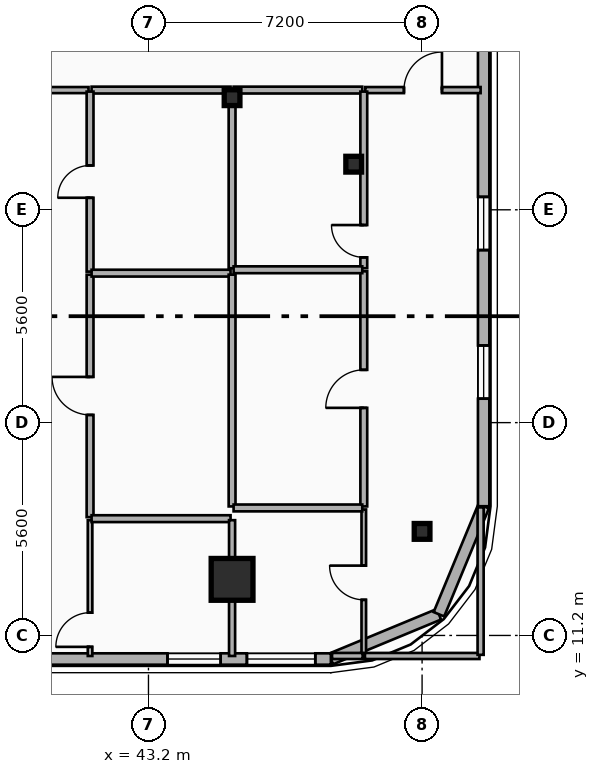
"""IFC4 building model, lengths in metres.
Left out: names, types, materials, properties, quantities, classifications, styles, units other than length and angle.
Written with IfcOpenShell. Run it as: python <this file> out.ifc"""

import sys

from ifc_helpers import new_model, si_unit, direction, frame, frame_2d, origin, origin_2d, place, context, subcontext, project, spatial, rectangle, i_section, extrude, element, fill, save


model = new_model("IFC4")
c1 = context("Model", 3, precision=1e-05, world=origin(), true_north=direction((0.0, 1.0)))
c2 = subcontext(c1, "Body", "Model", "MODEL_VIEW")
j1 = project(units=[si_unit("LENGTHUNIT", "METRE"), si_unit("PLANEANGLEUNIT", "RADIAN")], contexts=[c1])
p1 = place(None, origin())
s1 = spatial("IfcSite", under=j1, at=p1, CompositionType="ELEMENT")
p2 = place(p1, origin())
s2 = spatial("IfcBuilding", under=s1, at=p2, CompositionType="ELEMENT")
p3 = place(p2, frame((0.0, 0.0, 148.35)))
s3 = spatial("IfcBuildingStorey", under=s2, at=p3, CompositionType="ELEMENT", Elevation=148.35)
p4 = place(p3, frame((45.4, 25.35, 0.0), z_axis=(0.0, 0.0, 1.0), x_axis=(1.0, 0.0, 0.0)))
e1 = element("IfcColumn", 1, at=p4, inside=s3, PredefinedType="COLUMN", context=c2, shape_type="SweptSolid", body=[
    extrude(i_section(OverallWidth=0.413, OverallDepth=0.415, WebThickness=0.03, FlangeThickness=0.047, FilletRadius=0.015, at=origin_2d()), origin(), (0.0, 0.0, 1.0), 3.55),
])
p5 = place(p3, frame((45.4, 12.784, 0.0), z_axis=(0.0, -0.090208423039, 0.99592290887), x_axis=(1.0, 0.0, 0.0)))
e2 = element("IfcColumn", 2, at=p5, inside=s3, PredefinedType="COLUMN", context=c2, shape_type="SweptSolid", body=[
    extrude(rectangle(XDim=1.1, YDim=1.1, at=origin_2d()), origin(), (0.0, 0.0, 1.0), 3.564),
])
p6 = place(p3, frame((48.6, 23.6, 0.0), z_axis=(0.0, 0.0, 1.0), x_axis=(1.0, 0.0, 0.0)))
e3 = element("IfcColumn", 3, at=p6, inside=s3, PredefinedType="COLUMN", context=c2, shape_type="SweptSolid", body=[
    extrude(i_section(OverallWidth=0.413, OverallDepth=0.415, WebThickness=0.03, FlangeThickness=0.047, FilletRadius=0.015, at=origin_2d()), origin(), (0.0, 0.0, 1.0), 3.55),
])
p7 = place(p3, frame((50.4, 14.034, 0.0), z_axis=(0.0, -0.079867837887, 0.996805461698), x_axis=(1.0, 0.0, 0.0)))
e4 = element("IfcColumn", 4, at=p7, inside=s3, PredefinedType="COLUMN", context=c2, shape_type="SweptSolid", body=[
    extrude(i_section(OverallWidth=0.413, OverallDepth=0.415, WebThickness=0.03, FlangeThickness=0.047, FilletRadius=0.015, at=origin_2d()), origin(), (0.0, 0.0, 1.0), 3.561),
])
p8 = place(p3, frame((50.843, 11.757, 0.0), z_axis=(0.0, 0.0, 1.0), x_axis=(-0.92389884758, -0.382636798336, 0.0)))
e5 = element("IfcWall", 5, at=p8, inside=s3, PredefinedType="SOLIDWALL", context=c2, shape_type="SweptSolid", body=[
    extrude(rectangle(XDim=3.077, YDim=0.3, at=frame_2d((1.538, 0.0))), origin(), (0.0, 0.0, 1.0), 3.29),
])
p9 = place(p3, frame((52.02, 14.6, 0.0), z_axis=(0.0, 0.0, 1.0), x_axis=(-0.382676475685, -0.923882414032, 0.0)))
e6 = element("IfcWall", 6, at=p9, inside=s3, PredefinedType="SOLIDWALL", context=c2, shape_type="SweptSolid", body=[
    extrude(rectangle(XDim=3.077, YDim=0.3, at=frame_2d((1.539, 0.0))), origin(), (0.0, 0.0, 1.0), 3.29),
])
p10 = place(p3, frame((52.02, 37.6, 0.0), z_axis=(0.0, 0.0, 1.0), x_axis=(0.0, -1.0, 0.0)))
e7 = element("IfcWall", 7, at=p10, inside=s3, PredefinedType="SOLIDWALL", context=c2, shape_type="SweptSolid", body=[
    extrude(rectangle(XDim=23.0, YDim=0.3, at=frame_2d((11.5, 0.0))), origin(), (0.0, 0.0, 1.0), 3.29),
])
p11 = place(p10, frame((2.513, 0.0, 0.34)))
e8 = element("IfcOpeningElement", 8, at=p11, cuts=e7, PredefinedType="OPENING", context=c2, shape_type="SweptSolid", body=[
    extrude(rectangle(XDim=1.4, YDim=2.1, at=frame_2d((0.7, 1.05))), frame((0.0, 0.16, 0.0), z_axis=(0.0, -1.0, 0.0), x_axis=(1.0, 0.0, 0.0)), (0.0, 0.0, 1.0), 0.32),
])
p12 = place(p10, frame((6.107, 0.0, 0.34)))
e9 = element("IfcOpeningElement", 9, at=p12, cuts=e7, PredefinedType="OPENING", context=c2, shape_type="SweptSolid", body=[
    extrude(rectangle(XDim=1.4, YDim=2.1, at=frame_2d((0.7, 1.05))), frame((0.0, 0.16, 0.0), z_axis=(0.0, -1.0, 0.0), x_axis=(1.0, 0.0, 0.0)), (0.0, 0.0, 1.0), 0.32),
])
p13 = place(p10, frame((14.86, 0.0, 0.34)))
e10 = element("IfcOpeningElement", 10, at=p13, cuts=e7, PredefinedType="OPENING", context=c2, shape_type="SweptSolid", body=[
    extrude(rectangle(XDim=1.4, YDim=2.1, at=frame_2d((0.7, 1.05))), frame((0.0, 0.16, 0.0), z_axis=(0.0, -1.0, 0.0), x_axis=(1.0, 0.0, 0.0)), (0.0, 0.0, 1.0), 0.32),
])
p14 = place(p10, frame((18.77, 0.0, 0.34)))
e11 = element("IfcOpeningElement", 11, at=p14, cuts=e7, PredefinedType="OPENING", context=c2, shape_type="SweptSolid", body=[
    extrude(rectangle(XDim=1.4, YDim=2.1, at=frame_2d((0.7, 1.05))), frame((0.0, 0.16, 0.0), z_axis=(0.0, -1.0, 0.0), x_axis=(1.0, 0.0, 0.0)), (0.0, 0.0, 1.0), 0.32),
])
p15 = place(p3, frame((48.0, 10.58, 0.0), z_axis=(0.0, 0.0, 1.0), x_axis=(-1.0, 0.0, 0.0)))
e12 = element("IfcWall", 12, at=p15, inside=s3, PredefinedType="SOLIDWALL", context=c2, shape_type="SweptSolid", body=[
    extrude(rectangle(XDim=38.4, YDim=0.3, at=frame_2d((19.2, 0.0))), origin(), (0.0, 0.0, 1.0), 3.29),
])
p16 = place(p15, frame((36.19, 0.0, 0.34)))
e13 = element("IfcOpeningElement", 13, at=p16, cuts=e12, PredefinedType="OPENING", context=c2, shape_type="SweptSolid", body=[
    extrude(rectangle(XDim=1.8, YDim=1.8, at=frame_2d((0.9, 0.9))), frame((0.0, 0.16, 0.0), z_axis=(0.0, -1.0, 0.0), x_axis=(1.0, 0.0, 0.0)), (0.0, 0.0, 1.0), 0.32),
])
p17 = place(p15, frame((27.938, 0.0, 0.34)))
e14 = element("IfcOpeningElement", 14, at=p17, cuts=e12, PredefinedType="OPENING", context=c2, shape_type="SweptSolid", body=[
    extrude(rectangle(XDim=1.2, YDim=1.5, at=frame_2d((0.6, 0.75))), frame((0.0, 0.16, 0.0), z_axis=(0.0, -1.0, 0.0), x_axis=(1.0, 0.0, 0.0)), (0.0, 0.0, 1.0), 0.32),
])
p18 = place(p15, frame((25.719, 0.0, 0.34)))
e15 = element("IfcOpeningElement", 15, at=p18, cuts=e12, PredefinedType="OPENING", context=c2, shape_type="SweptSolid", body=[
    extrude(rectangle(XDim=1.4, YDim=1.8, at=frame_2d((0.7, 0.9))), frame((0.0, 0.16, 0.0), z_axis=(0.0, -1.0, 0.0), x_axis=(1.0, 0.0, 0.0)), (0.0, 0.0, 1.0), 0.32),
])
p19 = place(p15, frame((33.861, 0.0, 1.22)))
e16 = element("IfcOpeningElement", 16, at=p19, cuts=e12, PredefinedType="OPENING", context=c2, shape_type="SweptSolid", body=[
    extrude(rectangle(XDim=1.2, YDim=1.5, at=frame_2d((0.6, 0.75))), frame((0.0, 0.16, 0.0), z_axis=(0.0, -1.0, 0.0), x_axis=(1.0, 0.0, 0.0)), (0.0, 0.0, 1.0), 0.32),
])
p20 = place(p15, frame((20.1, 0.0, 0.65)))
e17 = element("IfcOpeningElement", 17, at=p20, cuts=e12, PredefinedType="OPENING", context=c2, shape_type="SweptSolid", body=[
    extrude(rectangle(XDim=2.1, YDim=2.1, at=frame_2d((1.05, 1.05))), frame((0.0, 0.16, 0.0), z_axis=(0.0, -1.0, 0.0), x_axis=(1.0, 0.0, 0.0)), (0.0, 0.0, 1.0), 0.32),
])
p21 = place(p15, frame((22.95, 0.0, 0.8)))
e18 = element("IfcOpeningElement", 18, at=p21, cuts=e12, PredefinedType="OPENING", context=c2, shape_type="SweptSolid", body=[
    extrude(rectangle(XDim=1.8, YDim=1.8, at=frame_2d((0.9, 0.9))), frame((0.0, 0.16, 0.0), z_axis=(0.0, -1.0, 0.0), x_axis=(1.0, 0.0, 0.0)), (0.0, 0.0, 1.0), 0.32),
])
p22 = place(p15, frame((13.35, 0.0, 0.65)))
e19 = element("IfcOpeningElement", 19, at=p22, cuts=e12, PredefinedType="OPENING", context=c2, shape_type="SweptSolid", body=[
    extrude(rectangle(XDim=2.1, YDim=2.1, at=frame_2d((1.05, 1.05))), frame((0.0, 0.16, 0.0), z_axis=(0.0, -1.0, 0.0), x_axis=(1.0, 0.0, 0.0)), (0.0, 0.0, 1.0), 0.32),
])
p23 = place(p15, frame((8.25, 0.0, 1.68)))
e20 = element("IfcOpeningElement", 20, at=p23, cuts=e12, PredefinedType="OPENING", context=c2, shape_type="SweptSolid", body=[
    extrude(rectangle(XDim=1.1, YDim=1.05, at=frame_2d((0.55, 0.525))), frame((0.0, 0.16, 0.0), z_axis=(0.0, -1.0, 0.0), x_axis=(1.0, 0.0, 0.0)), (0.0, 0.0, 1.0), 0.32),
])
p24 = place(p15, frame((2.9, 0.0, 0.34)))
e21 = element("IfcOpeningElement", 21, at=p24, cuts=e12, PredefinedType="OPENING", context=c2, shape_type="SweptSolid", body=[
    extrude(rectangle(XDim=1.4, YDim=1.8, at=frame_2d((0.7, 0.9))), frame((0.0, 0.16, 0.0), z_axis=(0.0, -1.0, 0.0), x_axis=(1.0, 0.0, 0.0)), (0.0, 0.0, 1.0), 0.32),
])
p25 = place(p15, frame((0.41, 0.0, 0.34)))
e22 = element("IfcOpeningElement", 22, at=p25, cuts=e12, PredefinedType="OPENING", context=c2, shape_type="SweptSolid", body=[
    extrude(rectangle(XDim=1.8, YDim=1.8, at=frame_2d((0.9, 0.9))), frame((0.0, 0.16, 0.0), z_axis=(0.0, -1.0, 0.0), x_axis=(1.0, 0.0, 0.0)), (0.0, 0.0, 1.0), 0.32),
])
p26 = place(p3, frame((38.39, 25.55, 0.0), z_axis=(0.0, 0.0, 1.0), x_axis=(1.0, 0.0, 0.0)))
e23 = element("IfcWall", 23, at=p26, inside=s3, PredefinedType="PARTITIONING", context=c2, shape_type="SweptSolid", body=[
    extrude(rectangle(XDim=3.233, YDim=0.16, at=frame_2d((1.617, 0.0))), origin(), (0.0, 0.0, 1.0), 3.29),
])
p27 = place(p26, frame((1.116, 0.0, 0.0)))
e24 = element("IfcOpeningElement", 24, at=p27, cuts=e23, PredefinedType="OPENING", context=c2, shape_type="SweptSolid", body=[
    extrude(rectangle(XDim=1.0, YDim=2.15, at=frame_2d((0.5, 1.075))), frame((0.0, 0.09, 0.0), z_axis=(0.0, -1.0, 0.0), x_axis=(1.0, 0.0, 0.0)), (0.0, 0.0, 1.0), 0.18),
])
p28 = place(p3, frame((41.703, 25.55, 0.0), z_axis=(0.0, 0.0, 1.0), x_axis=(1.0, 0.0, 0.0)))
e25 = element("IfcWall", 25, at=p28, inside=s3, PredefinedType="PLUMBINGWALL", context=c2, shape_type="SweptSolid", body=[
    extrude(rectangle(XDim=3.657, YDim=0.18, at=frame_2d((1.829, 0.0))), origin(), (0.0, 0.0, 1.0), 2.36),
])
p29 = place(p3, frame((48.906, 25.55, 0.0), z_axis=(0.0, 0.0, 1.0), x_axis=(1.0, 0.0, 0.0)))
e26 = element("IfcWall", 26, at=p29, inside=s3, PredefinedType="PARTITIONING", context=c2, shape_type="SweptSolid", body=[
    extrude(rectangle(XDim=3.034, YDim=0.16, at=frame_2d((1.517, 0.0))), origin(), (0.0, 0.0, 1.0), 2.62),
])
p30 = place(p29, frame((1.017, 0.0, 0.0)))
e27 = element("IfcOpeningElement", 27, at=p30, cuts=e26, PredefinedType="OPENING", context=c2, shape_type="SweptSolid", body=[
    extrude(rectangle(XDim=1.0, YDim=2.15, at=frame_2d((0.5, 1.075))), frame((0.0, 0.09, 0.0), z_axis=(0.0, -1.0, 0.0), x_axis=(1.0, 0.0, 0.0)), (0.0, 0.0, 1.0), 0.18),
])
p31 = place(p3, frame((45.44, 25.55, 0.0), z_axis=(0.0, 0.0, 1.0), x_axis=(1.0, 0.0, 0.0)))
e28 = element("IfcWall", 28, at=p31, inside=s3, PredefinedType="PLUMBINGWALL", context=c2, shape_type="SweptSolid", body=[
    extrude(rectangle(XDim=3.386, YDim=0.18, at=frame_2d((1.693, 0.0))), origin(), (0.0, 0.0, 1.0), 2.36),
])
p32 = place(p3, frame((41.663, 10.66, 0.0), z_axis=(0.0, 0.0, 1.0), x_axis=(0.0, 1.0, 0.0)))
e29 = element("IfcWall", 29, at=p32, inside=s3, PredefinedType="PARTITIONING", context=c2, shape_type="SweptSolid", body=[
    extrude(rectangle(XDim=3.573, YDim=0.12, at=frame_2d((1.787, 0.0))), origin(), (0.0, 0.0, 1.0), 2.91),
])
p33 = place(p32, frame((0.24, 0.0, 0.0)))
e30 = element("IfcOpeningElement", 30, at=p33, cuts=e29, PredefinedType="OPENING", context=c2, shape_type="SweptSolid", body=[
    extrude(rectangle(XDim=0.9, YDim=2.1, at=frame_2d((0.45, 1.05))), frame((0.0, 0.07, 0.0), z_axis=(0.0, -1.0, 0.0), x_axis=(1.0, 0.0, 0.0)), (0.0, 0.0, 1.0), 0.14),
])
p34 = place(p3, frame((41.663, 14.313, 0.0), z_axis=(0.0, 0.0, 1.0), x_axis=(0.0, 1.0, 0.0)))
e31 = element("IfcWall", 31, at=p34, inside=s3, PredefinedType="PLUMBINGWALL", context=c2, shape_type="SweptSolid", body=[
    extrude(rectangle(XDim=6.38, YDim=0.18, at=frame_2d((3.19, 0.0))), origin(), (0.0, 0.0, 1.0), 2.72),
])
p35 = place(p34, frame((2.69, 0.0, 0.0)))
e32 = element("IfcOpeningElement", 32, at=p35, cuts=e31, PredefinedType="OPENING", context=c2, shape_type="SweptSolid", body=[
    extrude(rectangle(XDim=1.0, YDim=2.15, at=frame_2d((0.5, 1.075))), frame((0.0, 0.1, 0.0), z_axis=(0.0, -1.0, 0.0), x_axis=(1.0, 0.0, 0.0)), (0.0, 0.0, 1.0), 0.2),
])
p36 = place(p3, frame((41.663, 20.773, 0.0), z_axis=(0.0, 0.0, 1.0), x_axis=(0.0, 1.0, 0.0)))
e33 = element("IfcWall", 33, at=p36, inside=s3, PredefinedType="PLUMBINGWALL", context=c2, shape_type="SweptSolid", body=[
    extrude(rectangle(XDim=4.737, YDim=0.18, at=frame_2d((2.369, 0.0))), origin(), (0.0, 0.0, 1.0), 2.88),
])
p37 = place(p36, frame((1.944, 0.0, 0.0)))
e34 = element("IfcOpeningElement", 34, at=p37, cuts=e33, PredefinedType="OPENING", context=c2, shape_type="SweptSolid", body=[
    extrude(rectangle(XDim=0.85, YDim=2.1, at=frame_2d((0.425, 1.05))), frame((0.0, 0.1, 0.0), z_axis=(0.0, -1.0, 0.0), x_axis=(1.0, 0.0, 0.0)), (0.0, 0.0, 1.0), 0.2),
])
p38 = place(p3, frame((41.703, 14.273, 0.0), z_axis=(0.0, 0.0, 1.0), x_axis=(1.0, 0.0, 0.0)))
e35 = element("IfcWall", 35, at=p38, inside=s3, PredefinedType="PLUMBINGWALL", context=c2, shape_type="SweptSolid", body=[
    extrude(rectangle(XDim=3.657, YDim=0.18, at=frame_2d((1.829, 0.0))), origin(), (0.0, 0.0, 1.0), 2.36),
])
p39 = place(p3, frame((45.4, 10.66, 0.0), z_axis=(0.0, 0.0, 1.0), x_axis=(0.0, 1.0, 0.0)))
e36 = element("IfcWall", 36, at=p39, inside=s3, PredefinedType="PARTITIONING", context=c2, shape_type="SweptSolid", body=[
    extrude(rectangle(XDim=3.573, YDim=0.16, at=frame_2d((1.787, 0.0))), origin(), (0.0, 0.0, 1.0), 2.36),
])
p40 = place(p3, frame((41.703, 20.733, 0.0), z_axis=(0.0, 0.0, 1.0), x_axis=(1.0, 0.0, 0.0)))
e37 = element("IfcWall", 37, at=p40, inside=s3, PredefinedType="PLUMBINGWALL", context=c2, shape_type="SweptSolid", body=[
    extrude(rectangle(XDim=3.657, YDim=0.18, at=frame_2d((1.829, 0.0))), origin(), (0.0, 0.0, 1.0), 2.36),
])
p41 = place(p3, frame((45.4, 14.595, 0.0), z_axis=(0.0, 0.0, 1.0), x_axis=(0.0, 1.0, 0.0)))
e38 = element("IfcWall", 38, at=p41, inside=s3, PredefinedType="PLUMBINGWALL", context=c2, shape_type="SweptSolid", body=[
    extrude(rectangle(XDim=6.098, YDim=0.18, at=frame_2d((3.049, 0.0))), origin(), (0.0, 0.0, 1.0), 2.36),
])
p42 = place(p3, frame((45.4, 20.862, 0.0), z_axis=(0.0, 0.0, 1.0), x_axis=(0.0, 1.0, 0.0)))
e39 = element("IfcWall", 39, at=p42, inside=s3, PredefinedType="PLUMBINGWALL", context=c2, shape_type="SweptSolid", body=[
    extrude(rectangle(XDim=4.648, YDim=0.18, at=frame_2d((2.324, 0.0))), origin(), (0.0, 0.0, 1.0), 2.36),
])
p43 = place(p3, frame((48.866, 10.66, 0.0), z_axis=(0.0, 0.0, 1.0), x_axis=(0.0, 1.0, 0.0)))
e40 = element("IfcWall", 40, at=p43, inside=s3, PredefinedType="PARTITIONING", context=c2, shape_type="SweptSolid", body=[
    extrude(rectangle(XDim=3.855, YDim=0.12, at=frame_2d((1.927, 0.0))), origin(), (0.0, 0.0, 1.0), 2.77),
])
p44 = place(p43, frame((1.478, 0.0, 0.0)))
e41 = element("IfcOpeningElement", 41, at=p44, cuts=e40, PredefinedType="OPENING", context=c2, shape_type="SweptSolid", body=[
    extrude(rectangle(XDim=0.9, YDim=2.1, at=frame_2d((0.45, 1.05))), frame((0.0, 0.07, 0.0), z_axis=(0.0, -1.0, 0.0), x_axis=(1.0, 0.0, 0.0)), (0.0, 0.0, 1.0), 0.14),
])
p45 = place(p3, frame((48.866, 14.595, 0.0), z_axis=(0.0, 0.0, 1.0), x_axis=(0.0, 1.0, 0.0)))
e42 = element("IfcWall", 42, at=p45, inside=s3, PredefinedType="PLUMBINGWALL", context=c2, shape_type="SweptSolid", body=[
    extrude(rectangle(XDim=6.187, YDim=0.18, at=frame_2d((3.094, 0.0))), origin(), (0.0, 0.0, 1.0), 2.77),
])
p46 = place(p45, frame((2.594, 0.0, 0.0)))
e43 = element("IfcOpeningElement", 43, at=p46, cuts=e42, PredefinedType="OPENING", context=c2, shape_type="SweptSolid", body=[
    extrude(rectangle(XDim=1.0, YDim=2.15, at=frame_2d((0.5, 1.075))), frame((0.0, 0.1, 0.0), z_axis=(0.0, -1.0, 0.0), x_axis=(1.0, 0.0, 0.0)), (0.0, 0.0, 1.0), 0.2),
])
p47 = place(p3, frame((48.866, 20.862, 0.0), z_axis=(0.0, 0.0, 1.0), x_axis=(0.0, 1.0, 0.0)))
e44 = element("IfcWall", 44, at=p47, inside=s3, PredefinedType="PLUMBINGWALL", context=c2, shape_type="SweptSolid", body=[
    extrude(rectangle(XDim=4.648, YDim=0.18, at=frame_2d((2.324, 0.0))), origin(), (0.0, 0.0, 1.0), 2.77),
])
p48 = place(p47, frame((0.287, 0.0, 0.0)))
e45 = element("IfcOpeningElement", 45, at=p48, cuts=e44, PredefinedType="OPENING", context=c2, shape_type="SweptSolid", body=[
    extrude(rectangle(XDim=0.85, YDim=2.1, at=frame_2d((0.425, 1.05))), frame((0.0, 0.1, 0.0), z_axis=(0.0, -1.0, 0.0), x_axis=(1.0, 0.0, 0.0)), (0.0, 0.0, 1.0), 0.2),
])
for number, where, z_axis, x_axis in (
    (46, (45.44, 14.555, 0.0), (0.0, 0.0, 1.0), (1.0, 0.0, 0.0)),
    (47, (45.44, 20.822, 0.0), (0.0, 0.0, 1.0), (1.0, 0.0, 0.0)),
):
    element("IfcWall", number, at=place(p3, frame(where, z_axis=z_axis, x_axis=x_axis)), inside=s3, PredefinedType="PLUMBINGWALL", context=c2, shape_type="SweptSolid", body=[
        extrude(rectangle(XDim=3.386, YDim=0.18, at=frame_2d((1.693, 0.0))), origin(), (0.0, 0.0, 1.0), 2.36),
    ])
p49 = place(p3, frame((48.896, 10.66, 0.0), z_axis=(0.0, 0.0, 1.0), x_axis=(1.0, 0.0, 0.0)))
e48 = element("IfcWall", 48, at=p49, inside=s3, PredefinedType="PARTITIONING", context=c2, shape_type="SweptSolid", body=[
    extrude(rectangle(XDim=3.014, YDim=0.16, at=frame_2d((1.507, 0.0))), origin(), (0.0, 0.0, 1.0), 3.29),
])
p50 = place(p3, frame((51.94, 10.69, 0.0), z_axis=(0.0, 0.0, 1.0), x_axis=(0.0, 1.0, 0.0)))
e49 = element("IfcWall", 49, at=p50, inside=s3, PredefinedType="PARTITIONING", context=c2, shape_type="SweptSolid", body=[
    extrude(rectangle(XDim=3.88, YDim=0.16, at=frame_2d((1.94, 0.0))), origin(), (0.0, 0.0, 1.0), 3.29),
])
p51 = place(p3, frame((48.03, 10.66, 0.0), z_axis=(0.0, 0.0, 1.0), x_axis=(1.0, 0.0, 0.0)))
e50 = element("IfcWall", 50, at=p51, inside=s3, PredefinedType="PARTITIONING", context=c2, shape_type="SweptSolid", body=[
    extrude(rectangle(XDim=0.806, YDim=0.16, at=frame_2d((0.403, 0.0))), origin(), (0.0, 0.0, 1.0), 3.29),
])
p52 = place(p13, origin())
e51 = element("IfcWindow", 51, at=p52, inside=s3, PartitioningType="SINGLE_PANEL", PredefinedType="WINDOW", context=c2, shape_type="SweptSolid", body=[
    extrude(rectangle(XDim=1.4, YDim=2.1, at=frame_2d((0.7, 1.05))), frame((0.0, 0.03, 0.0), z_axis=(0.0, -1.0, 0.0), x_axis=(1.0, 0.0, 0.0)), (0.0, 0.0, 1.0), 0.06),
])
fill(e10, e51)
p53 = place(p14, origin())
e52 = element("IfcWindow", 52, at=p53, inside=s3, PartitioningType="SINGLE_PANEL", PredefinedType="WINDOW", context=c2, shape_type="SweptSolid", body=[
    extrude(rectangle(XDim=1.4, YDim=2.1, at=frame_2d((0.7, 1.05))), frame((0.0, 0.03, 0.0), z_axis=(0.0, -1.0, 0.0), x_axis=(1.0, 0.0, 0.0)), (0.0, 0.0, 1.0), 0.06),
])
fill(e11, e52)
p54 = place(p24, origin())
e53 = element("IfcWindow", 53, at=p54, inside=s3, PartitioningType="SINGLE_PANEL", PredefinedType="WINDOW", context=c2, shape_type="SweptSolid", body=[
    extrude(rectangle(XDim=1.4, YDim=1.8, at=frame_2d((0.7, 0.9))), frame((0.0, 0.03, 0.0), z_axis=(0.0, -1.0, 0.0), x_axis=(1.0, 0.0, 0.0)), (0.0, 0.0, 1.0), 0.06),
])
fill(e21, e53)
p55 = place(p25, origin())
e54 = element("IfcWindow", 54, at=p55, inside=s3, PartitioningType="SINGLE_PANEL", PredefinedType="WINDOW", context=c2, shape_type="SweptSolid", body=[
    extrude(rectangle(XDim=1.8, YDim=1.8, at=frame_2d((0.9, 0.9))), frame((0.0, 0.03, 0.0), z_axis=(0.0, -1.0, 0.0), x_axis=(1.0, 0.0, 0.0)), (0.0, 0.0, 1.0), 0.06),
])
fill(e22, e54)
p56 = place(p30, origin())
e55 = element("IfcDoor", 55, at=p56, inside=s3, OperationType="SINGLE_SWING_RIGHT", PredefinedType="DOOR", context=c2, shape_type="SweptSolid", body=[
    extrude(rectangle(XDim=1.0, YDim=2.15, at=frame_2d((0.5, 1.075))), frame((0.0, 0.025, 0.0), z_axis=(0.0, -1.0, 0.0), x_axis=(1.0, 0.0, 0.0)), (0.0, 0.0, 1.0), 0.05),
])
fill(e27, e55)
p57 = place(p33, origin())
e56 = element("IfcDoor", 56, at=p57, inside=s3, OperationType="SINGLE_SWING_LEFT", PredefinedType="DOOR", context=c2, shape_type="SweptSolid", body=[
    extrude(rectangle(XDim=0.9, YDim=2.1, at=frame_2d((0.45, 1.05))), frame((0.0, 0.025, 0.0), z_axis=(0.0, -1.0, 0.0), x_axis=(1.0, 0.0, 0.0)), (0.0, 0.0, 1.0), 0.05),
])
fill(e30, e56)
p58 = place(p35, origin())
e57 = element("IfcDoor", 57, at=p58, inside=s3, OperationType="SINGLE_SWING_RIGHT", PredefinedType="DOOR", context=c2, shape_type="SweptSolid", body=[
    extrude(rectangle(XDim=1.0, YDim=2.15, at=frame_2d((0.5, 1.075))), frame((0.0, 0.025, 0.0), z_axis=(0.0, -1.0, 0.0), x_axis=(1.0, 0.0, 0.0)), (0.0, 0.0, 1.0), 0.05),
])
fill(e32, e57)
p59 = place(p37, origin())
e58 = element("IfcDoor", 58, at=p59, inside=s3, OperationType="SINGLE_SWING_LEFT", PredefinedType="DOOR", context=c2, shape_type="SweptSolid", body=[
    extrude(rectangle(XDim=0.85, YDim=2.1, at=frame_2d((0.425, 1.05))), frame((0.0, 0.025, 0.0), z_axis=(0.0, -1.0, 0.0), x_axis=(1.0, 0.0, 0.0)), (0.0, 0.0, 1.0), 0.05),
])
fill(e34, e58)
p60 = place(p44, origin())
e59 = element("IfcDoor", 59, at=p60, inside=s3, OperationType="SINGLE_SWING_RIGHT", PredefinedType="DOOR", context=c2, shape_type="SweptSolid", body=[
    extrude(rectangle(XDim=0.9, YDim=2.1, at=frame_2d((0.45, 1.05))), frame((0.0, 0.025, 0.0), z_axis=(0.0, -1.0, 0.0), x_axis=(1.0, 0.0, 0.0)), (0.0, 0.0, 1.0), 0.05),
])
fill(e41, e59)
p61 = place(p46, origin())
e60 = element("IfcDoor", 60, at=p61, inside=s3, OperationType="SINGLE_SWING_LEFT", PredefinedType="DOOR", context=c2, shape_type="SweptSolid", body=[
    extrude(rectangle(XDim=1.0, YDim=2.15, at=frame_2d((0.5, 1.075))), frame((0.0, 0.025, 0.0), z_axis=(0.0, -1.0, 0.0), x_axis=(1.0, 0.0, 0.0)), (0.0, 0.0, 1.0), 0.05),
])
fill(e43, e60)
p62 = place(p48, origin())
e61 = element("IfcDoor", 61, at=p62, inside=s3, OperationType="SINGLE_SWING_RIGHT", PredefinedType="DOOR", context=c2, shape_type="SweptSolid", body=[
    extrude(rectangle(XDim=0.85, YDim=2.1, at=frame_2d((0.425, 1.05))), frame((0.0, 0.025, 0.0), z_axis=(0.0, -1.0, 0.0), x_axis=(1.0, 0.0, 0.0)), (0.0, 0.0, 1.0), 0.05),
])
fill(e45, e61)
save(model, sys.argv[1])
